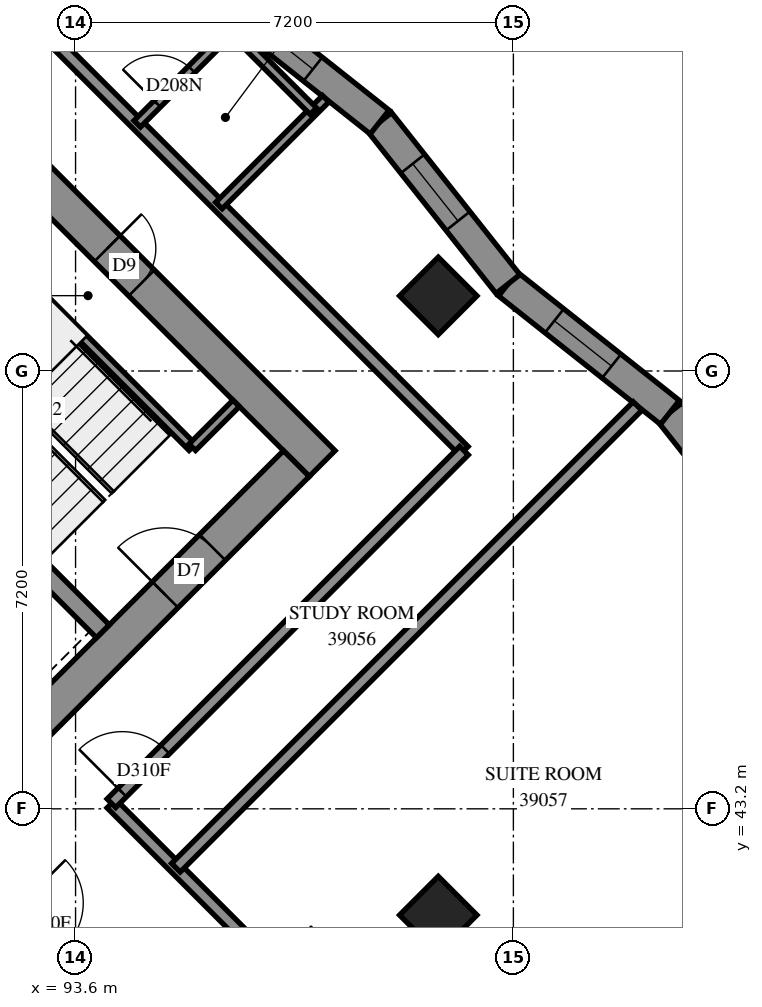
"""IFC4 building model, lengths in metres.
Left out: names, types, materials, properties, quantities, classifications, styles, units other than length and angle.
Written with IfcOpenShell. Run it as: python <this file> out.ifc"""

import sys

from ifc_helpers import new_model, si_unit, direction, frame, frame_2d, origin, origin_2d, place, context, subcontext, project, spatial, polyline, rectangle, outline, extrude, element, fill, save


model = new_model("IFC4")
c1 = context("Model", 3, precision=1e-05, world=origin(), true_north=direction((0.0, 1.0)))
c2 = subcontext(c1, "Body", "Model", "MODEL_VIEW")
j1 = project(units=[si_unit("LENGTHUNIT", "METRE"), si_unit("PLANEANGLEUNIT", "RADIAN")], contexts=[c1])
p1 = place(None, origin())
s1 = spatial("IfcSite", under=j1, at=p1, CompositionType="ELEMENT")
p2 = place(p1, origin())
s2 = spatial("IfcBuilding", under=s1, at=p2, CompositionType="ELEMENT")
p3 = place(p2, frame((0.0, 0.0, 145.6)))
s3 = spatial("IfcBuildingStorey", under=s2, at=p3, CompositionType="ELEMENT", Elevation=145.6)
for number, where, z_axis, x_axis in (
    (1, (99.565, 51.635, 0.0), (0.0, 0.0, 1.0), (0.707, -0.707, 0.0)),
    (2, (99.565, 41.453, 0.0), (0.0, 0.0, 1.0), (0.707, -0.707, 0.0)),
):
    element("IfcColumn", number, at=place(p3, frame(where, z_axis=z_axis, x_axis=x_axis)), inside=s3, PredefinedType="COLUMN", context=c2, shape_type="SweptSolid", body=[
        extrude(rectangle(XDim=0.9, YDim=0.9, at=origin_2d()), origin(), (0.0, 0.0, 1.0), 3.1),
    ])
p4 = place(p3, frame((86.625, 59.908, -0.3), z_axis=(0.0, 0.0, 1.0), x_axis=(0.7071067812, -0.7071067812, 0.0)))
e3 = element("IfcWall", 3, at=p4, inside=s3, PredefinedType="SHEAR", context=c2, shape_type="SweptSolid", body=[
    extrude(rectangle(XDim=15.6, YDim=0.6, at=frame_2d((7.8, 0.0))), origin(), (0.0, 0.0, 1.0), 2.7),
])
p5 = place(p4, frame((10.6, 0.0, 0.3)))
e4 = element("IfcOpeningElement", 4, at=p5, cuts=e3, PredefinedType="OPENING", context=c2, shape_type="SweptSolid", body=[
    extrude(rectangle(XDim=0.8, YDim=2.1, at=frame_2d((0.4, 1.05))), frame((0.0, 0.31, 0.0), z_axis=(0.0, -1.0, 0.0), x_axis=(1.0, 0.0, 0.0)), (0.0, 0.0, 1.0), 0.62),
])
p6 = place(p3, frame((87.049, 38.695, -0.3), z_axis=(0.0, 0.0, 1.0), x_axis=(0.7071067812, 0.7071067812, 0.0)))
e5 = element("IfcWall", 5, at=p6, inside=s3, PredefinedType="SHEAR", context=c2, shape_type="SweptSolid", body=[
    extrude(rectangle(XDim=14.4, YDim=0.6, at=frame_2d((7.2, 0.0))), origin(), (0.0, 0.0, 1.0), 2.7),
])
p7 = place(p6, frame((4.55, 0.0, 0.3)))
e6 = element("IfcOpeningElement", 6, at=p7, cuts=e5, PredefinedType="OPENING", context=c2, shape_type="SweptSolid", body=[
    extrude(rectangle(XDim=1.1, YDim=2.1, at=frame_2d((0.55, 1.05))), frame((0.0, 0.31, 0.0), z_axis=(0.0, -1.0, 0.0), x_axis=(1.0, 0.0, 0.0)), (0.0, 0.0, 1.0), 0.62),
])
p8 = place(p6, frame((11.35, 0.0, 0.3)))
e7 = element("IfcOpeningElement", 7, at=p8, cuts=e5, PredefinedType="OPENING", context=c2, shape_type="SweptSolid", body=[
    extrude(rectangle(XDim=1.1, YDim=2.1, at=frame_2d((0.55, 1.05))), frame((0.0, 0.31, 0.0), z_axis=(0.0, -1.0, 0.0), x_axis=(1.0, 0.0, 0.0)), (0.0, 0.0, 1.0), 0.62),
])
p9 = place(p3, frame((88.958, 51.211, 0.0), z_axis=(0.0, 0.0, 1.0), x_axis=(0.7070998367, -0.7071137256, 0.0)))
e8 = element("IfcWall", 8, at=p9, inside=s3, PredefinedType="SOLIDWALL", context=c2, shape_type="SweptSolid", body=[
    extrude(rectangle(XDim=7.2, YDim=0.3, at=frame_2d((3.6, 0.0))), origin(), (0.0, 0.0, 1.0), 3.1),
])
p10 = place(p3, frame((105.499, 47.039, 0.0), z_axis=(0.0, 0.0, 1.0), x_axis=(-0.6210369057, 0.7837813227, 0.0)))
e9 = element("IfcWall", 9, at=p10, inside=s3, PredefinedType="SOLIDWALL", context=c2, shape_type="SweptSolid", body=[
    extrude(outline(polyline([(0.051, -0.25), (3.449, -0.25), (3.391, 0.25), (-0.051, 0.25), (0.051, -0.25)])), origin(), (0.0, 0.0, 1.0), 3.1),
])
p11 = place(p10, frame((1.095, 0.0, 0.45)))
e10 = element("IfcOpeningElement", 10, at=p11, cuts=e9, PredefinedType="OPENING", context=c2, shape_type="SweptSolid", body=[
    extrude(rectangle(XDim=1.2, YDim=2.5, at=frame_2d((0.6, 1.25))), frame((0.0, 0.26, 0.0), z_axis=(0.0, -1.0, 0.0), x_axis=(1.0, 0.0, 0.0)), (0.0, 0.0, 1.0), 0.52),
])
p12 = place(p3, frame((103.375, 49.719, 0.0), z_axis=(0.0, 0.0, 1.0), x_axis=(-0.7837772273, 0.6210420742, 0.0)))
e11 = element("IfcWall", 11, at=p12, inside=s3, PredefinedType="SOLIDWALL", context=c2, shape_type="SweptSolid", body=[
    extrude(outline(polyline([(-0.029, -0.25), (3.369, -0.25), (3.427, 0.25), (0.029, 0.25), (-0.029, -0.25)])), origin(), (0.0, 0.0, 1.0), 3.1),
])
p13 = place(p12, frame((1.225, 0.0, 0.45)))
e12 = element("IfcOpeningElement", 12, at=p13, cuts=e11, PredefinedType="OPENING", context=c2, shape_type="SweptSolid", body=[
    extrude(rectangle(XDim=1.2, YDim=2.5, at=frame_2d((0.6, 1.25))), frame((0.0, 0.26, 0.0), z_axis=(0.0, -1.0, 0.0), x_axis=(1.0, 0.0, 0.0)), (0.0, 0.0, 1.0), 0.52),
])
p14 = place(p3, frame((100.711, 51.83, 0.0), z_axis=(0.0, 0.0, 1.0), x_axis=(-0.6210601514, 0.7837629032, 0.0)))
e13 = element("IfcWall", 13, at=p14, inside=s3, PredefinedType="SOLIDWALL", context=c2, shape_type="SweptSolid", body=[
    extrude(outline(polyline([(0.029, -0.25), (3.427, -0.25), (3.369, 0.25), (-0.029, 0.25), (0.029, -0.25)])), origin(), (0.0, 0.0, 1.0), 3.1),
])
p15 = place(p14, frame((1.323, 0.0, 0.45)))
e14 = element("IfcOpeningElement", 14, at=p15, cuts=e13, PredefinedType="OPENING", context=c2, shape_type="SweptSolid", body=[
    extrude(rectangle(XDim=1.2, YDim=2.5, at=frame_2d((0.6, 1.25))), frame((0.0, 0.26, 0.0), z_axis=(0.0, -1.0, 0.0), x_axis=(1.0, 0.0, 0.0)), (0.0, 0.0, 1.0), 0.52),
])
p16 = place(p3, frame((98.601, 54.493, 0.0), z_axis=(0.0, 0.0, 1.0), x_axis=(-0.7837629032, 0.6210601514, 0.0)))
e15 = element("IfcWall", 15, at=p16, inside=s3, PredefinedType="SOLIDWALL", context=c2, shape_type="SweptSolid", body=[
    extrude(outline(polyline([(-0.029, -0.25), (3.369, -0.25), (3.427, 0.25), (0.029, 0.25), (-0.029, -0.25)])), origin(), (0.0, 0.0, 1.0), 3.1),
])
p17 = place(p16, frame((1.401, 0.0, 0.45)))
e16 = element("IfcOpeningElement", 16, at=p17, cuts=e15, PredefinedType="OPENING", context=c2, shape_type="SweptSolid", body=[
    extrude(rectangle(XDim=1.2, YDim=2.5, at=frame_2d((0.6, 1.25))), frame((0.0, 0.26, 0.0), z_axis=(0.0, -1.0, 0.0), x_axis=(1.0, 0.0, 0.0)), (0.0, 0.0, 1.0), 0.52),
])
p18 = place(p3, frame((91.313, 53.354, 0.0), z_axis=(0.0, 0.0, 1.0), x_axis=(0.7071067812, -0.7071067812, 0.0)))
e17 = element("IfcWall", 17, at=p18, inside=s3, PredefinedType="PARTITIONING", context=c2, shape_type="SweptSolid", body=[
    extrude(rectangle(XDim=5.95, YDim=0.15, at=frame_2d((2.975, 0.0))), origin(), (0.0, 0.0, 1.0), 3.1),
])
p19 = place(p3, frame((95.52, 49.146, 0.0), z_axis=(0.0, 0.0, 1.0), x_axis=(0.7071067812, 0.7071067812, 0.0)))
e18 = element("IfcWall", 18, at=p19, inside=s3, PredefinedType="PARTITIONING", context=c2, shape_type="SweptSolid", body=[
    extrude(rectangle(XDim=1.02, YDim=0.15, at=frame_2d((0.51, 0.0))), origin(), (0.0, 0.0, 1.0), 3.1),
])
p20 = place(p3, frame((94.189, 43.287, 0.0), z_axis=(0.0, 0.0, 1.0), x_axis=(0.7071067812, -0.7071067812, 0.0)))
e19 = element("IfcWall", 19, at=p20, inside=s3, PredefinedType="PARTITIONING", context=c2, shape_type="SweptSolid", body=[
    extrude(rectangle(XDim=12.298, YDim=0.2, at=frame_2d((6.149, 0.0))), origin(), (0.0, 0.0, 1.0), 3.1),
])
p21 = place(p20, frame((3.755, 0.0, 0.0)))
e20 = element("IfcOpeningElement", 20, at=p21, cuts=e19, PredefinedType="OPENING", context=c2, shape_type="SweptSolid", body=[
    extrude(rectangle(XDim=0.9, YDim=2.1, at=frame_2d((0.45, 1.05))), frame((0.0, 0.11, 0.0), z_axis=(0.0, -1.0, 0.0), x_axis=(1.0, 0.0, 0.0)), (0.0, 0.0, 1.0), 0.22),
])
p22 = place(p20, frame((10.998, 0.0, 0.0)))
e21 = element("IfcOpeningElement", 21, at=p22, cuts=e19, PredefinedType="OPENING", context=c2, shape_type="SweptSolid", body=[
    extrude(rectangle(XDim=0.9, YDim=2.1, at=frame_2d((0.45, 1.05))), frame((0.0, 0.11, 0.0), z_axis=(0.0, -1.0, 0.0), x_axis=(1.0, 0.0, 0.0)), (0.0, 0.0, 1.0), 0.22),
])
p23 = place(p3, frame((91.755, 57.317, 0.0), z_axis=(0.0, 0.0, 1.0), x_axis=(0.7071067812, -0.7071067812, 0.0)))
e22 = element("IfcWall", 22, at=p23, inside=s3, PredefinedType="PARTITIONING", context=c2, shape_type="SweptSolid", body=[
    extrude(rectangle(XDim=11.639, YDim=0.2, at=frame_2d((5.819, 0.0))), origin(), (0.0, 0.0, 1.0), 3.1),
])
p24 = place(p3, frame((95.25, 42.232, 0.0), z_axis=(0.0, 0.0, 1.0), x_axis=(0.7071114386, 0.7071021238, 0.0)))
e23 = element("IfcWall", 23, at=p24, inside=s3, PredefinedType="PARTITIONING", context=c2, shape_type="SweptSolid", body=[
    extrude(rectangle(XDim=10.736, YDim=0.2, at=frame_2d((5.368, 0.0))), origin(), (0.0, 0.0, 1.0), 3.1),
])
p25 = place(p3, frame((94.19, 43.292, 0.0), z_axis=(0.0, 0.0, 1.0), x_axis=(0.7071067812, 0.7071067812, 0.0)))
e24 = element("IfcWall", 24, at=p25, inside=s3, PredefinedType="PARTITIONING", context=c2, shape_type="SweptSolid", body=[
    extrude(rectangle(XDim=8.2, YDim=0.2, at=frame_2d((4.1, 0.0))), origin(), (0.0, 0.0, 1.0), 3.1),
])
p26 = place(p25, frame((0.251, 0.0, 0.0)))
e25 = element("IfcOpeningElement", 25, at=p26, cuts=e24, PredefinedType="OPENING", context=c2, shape_type="SweptSolid", body=[
    extrude(rectangle(XDim=1.0, YDim=2.1, at=frame_2d((0.5, 1.05))), frame((0.0, 0.11, 0.0), z_axis=(0.0, -1.0, 0.0), x_axis=(1.0, 0.0, 0.0)), (0.0, 0.0, 1.0), 0.22),
])
p27 = place(p3, frame((92.639, 41.739, 0.0), z_axis=(0.0, 0.0, 1.0), x_axis=(0.7071067812, -0.7071067812, 0.0)))
e26 = element("IfcWall", 26, at=p27, inside=s3, PredefinedType="PARTITIONING", context=c2, shape_type="SweptSolid", body=[
    extrude(rectangle(XDim=5.1, YDim=0.2, at=frame_2d((2.55, 0.0))), origin(), (0.0, 0.0, 1.0), 3.1),
])
p28 = place(p27, frame((0.123, 0.0, 0.0)))
e27 = element("IfcOpeningElement", 27, at=p28, cuts=e26, PredefinedType="OPENING", context=c2, shape_type="SweptSolid", body=[
    extrude(rectangle(XDim=1.0, YDim=2.1, at=frame_2d((0.5, 1.05))), frame((0.0, 0.11, 0.0), z_axis=(0.0, -1.0, 0.0), x_axis=(1.0, 0.0, 0.0)), (0.0, 0.0, 1.0), 0.22),
])
p29 = place(p27, frame((3.734, 0.0, 0.0)))
e28 = element("IfcOpeningElement", 28, at=p29, cuts=e26, PredefinedType="OPENING", context=c2, shape_type="SweptSolid", body=[
    extrude(rectangle(XDim=0.9, YDim=2.1, at=frame_2d((0.45, 1.05))), frame((0.0, 0.11, 0.0), z_axis=(0.0, -1.0, 0.0), x_axis=(1.0, 0.0, 0.0)), (0.0, 0.0, 1.0), 0.22),
])
p30 = place(p3, frame((95.957, 53.121, 0.0), z_axis=(0.0, 0.0, 1.0), x_axis=(0.7071067812, 0.7071067812, 0.0)))
e29 = element("IfcWall", 29, at=p30, inside=s3, PredefinedType="PARTITIONING", context=c2, shape_type="SweptSolid", body=[
    extrude(rectangle(XDim=2.484, YDim=0.15, at=frame_2d((1.242, 0.0))), origin(), (0.0, 0.0, 1.0), 3.1),
])
p31 = place(p3, frame((94.614, 54.464, 0.0), z_axis=(0.0, 0.0, 1.0), x_axis=(0.7070846955, 0.7071288662, 0.0)))
e30 = element("IfcWall", 30, at=p31, inside=s3, PredefinedType="PARTITIONING", context=c2, shape_type="SweptSolid", body=[
    extrude(rectangle(XDim=2.264, YDim=0.15, at=frame_2d((1.132, 0.0))), origin(), (0.0, 0.0, 1.0), 3.1),
])
p32 = place(p31, frame((0.466, 0.0, 0.0)))
e31 = element("IfcOpeningElement", 31, at=p32, cuts=e30, PredefinedType="OPENING", context=c2, shape_type="SweptSolid", body=[
    extrude(rectangle(XDim=0.8, YDim=2.1, at=frame_2d((0.4, 1.05))), frame((0.0, 0.085, 0.0), z_axis=(0.0, -1.0, 0.0), x_axis=(1.0, 0.0, 0.0)), (0.0, 0.0, 1.0), 0.17),
])
p33 = place(p3, frame((96.271, 55.913, 0.0), z_axis=(0.0, 0.0, 1.0), x_axis=(0.7071067812, -0.7071067812, 0.0)))
e32 = element("IfcWall", 32, at=p33, inside=s3, PredefinedType="PARTITIONING", context=c2, shape_type="SweptSolid", body=[
    extrude(rectangle(XDim=1.754, YDim=0.15, at=frame_2d((0.877, 0.0))), origin(), (0.0, 0.0, 1.0), 3.1),
])
p34 = place(p13, origin())
e33 = element("IfcWindow", 33, at=p34, inside=s3, PartitioningType="SINGLE_PANEL", PredefinedType="WINDOW", context=c2, shape_type="SweptSolid", body=[
    extrude(rectangle(XDim=1.2, YDim=2.5, at=frame_2d((0.6, 1.25))), frame((0.0, 0.18, 0.0), z_axis=(0.0, -1.0, 0.0), x_axis=(1.0, 0.0, 0.0)), (0.0, 0.0, 1.0), 0.06),
])
fill(e12, e33)
p35 = place(p15, origin())
e34 = element("IfcWindow", 34, at=p35, inside=s3, PartitioningType="SINGLE_PANEL", PredefinedType="WINDOW", context=c2, shape_type="SweptSolid", body=[
    extrude(rectangle(XDim=1.2, YDim=2.5, at=frame_2d((0.6, 1.25))), frame((0.0, 0.18, 0.0), z_axis=(0.0, -1.0, 0.0), x_axis=(1.0, 0.0, 0.0)), (0.0, 0.0, 1.0), 0.06),
])
fill(e14, e34)
p36 = place(p17, origin())
e35 = element("IfcWindow", 35, at=p36, inside=s3, PartitioningType="SINGLE_PANEL", PredefinedType="WINDOW", context=c2, shape_type="SweptSolid", body=[
    extrude(rectangle(XDim=1.2, YDim=2.5, at=frame_2d((0.6, 1.25))), frame((0.0, 0.18, 0.0), z_axis=(0.0, -1.0, 0.0), x_axis=(1.0, 0.0, 0.0)), (0.0, 0.0, 1.0), 0.06),
])
fill(e16, e35)
p37 = place(p5, origin())
e36 = element("IfcDoor", 36, at=p37, inside=s3, OperationType="SINGLE_SWING_RIGHT", PredefinedType="DOOR", context=c2, shape_type="SweptSolid", body=[
    extrude(rectangle(XDim=0.8, YDim=2.1, at=frame_2d((0.4, 1.05))), frame((0.0, 0.025, 0.0), z_axis=(0.0, -1.0, 0.0), x_axis=(1.0, 0.0, 0.0)), (0.0, 0.0, 1.0), 0.05),
])
fill(e4, e36)
p38 = place(p8, origin())
e37 = element("IfcDoor", 37, at=p38, inside=s3, OperationType="SINGLE_SWING_RIGHT", PredefinedType="DOOR", context=c2, shape_type="SweptSolid", body=[
    extrude(rectangle(XDim=1.1, YDim=2.1, at=frame_2d((0.55, 1.05))), frame((0.0, 0.025, 0.0), z_axis=(0.0, -1.0, 0.0), x_axis=(1.0, 0.0, 0.0)), (0.0, 0.0, 1.0), 0.05),
])
fill(e7, e37)
p39 = place(p26, origin())
e38 = element("IfcDoor", 38, at=p39, inside=s3, OperationType="SINGLE_SWING_RIGHT", PredefinedType="DOOR", context=c2, shape_type="SweptSolid", body=[
    extrude(rectangle(XDim=1.0, YDim=2.1, at=frame_2d((0.5, 1.05))), frame((0.0, 0.025, 0.0), z_axis=(0.0, -1.0, 0.0), x_axis=(1.0, 0.0, 0.0)), (0.0, 0.0, 1.0), 0.05),
])
fill(e25, e38)
p40 = place(p32, origin())
e39 = element("IfcDoor", 39, at=p40, inside=s3, OperationType="SINGLE_SWING_RIGHT", PredefinedType="DOOR", context=c2, shape_type="SweptSolid", body=[
    extrude(rectangle(XDim=0.8, YDim=2.1, at=frame_2d((0.4, 1.05))), frame((0.0, 0.025, 0.0), z_axis=(0.0, -1.0, 0.0), x_axis=(1.0, 0.0, 0.0)), (0.0, 0.0, 1.0), 0.05),
])
fill(e31, e39)
p41 = place(p28, origin())
e40 = element("IfcDoor", 40, at=p41, inside=s3, OperationType="SINGLE_SWING_RIGHT", PredefinedType="DOOR", context=c2, shape_type="SweptSolid", body=[
    extrude(rectangle(XDim=1.0, YDim=2.1, at=frame_2d((0.5, 1.05))), frame((0.0, 0.025, 0.0), z_axis=(0.0, -1.0, 0.0), x_axis=(1.0, 0.0, 0.0)), (0.0, 0.0, 1.0), 0.05),
])
fill(e27, e40)
save(model, sys.argv[1])
